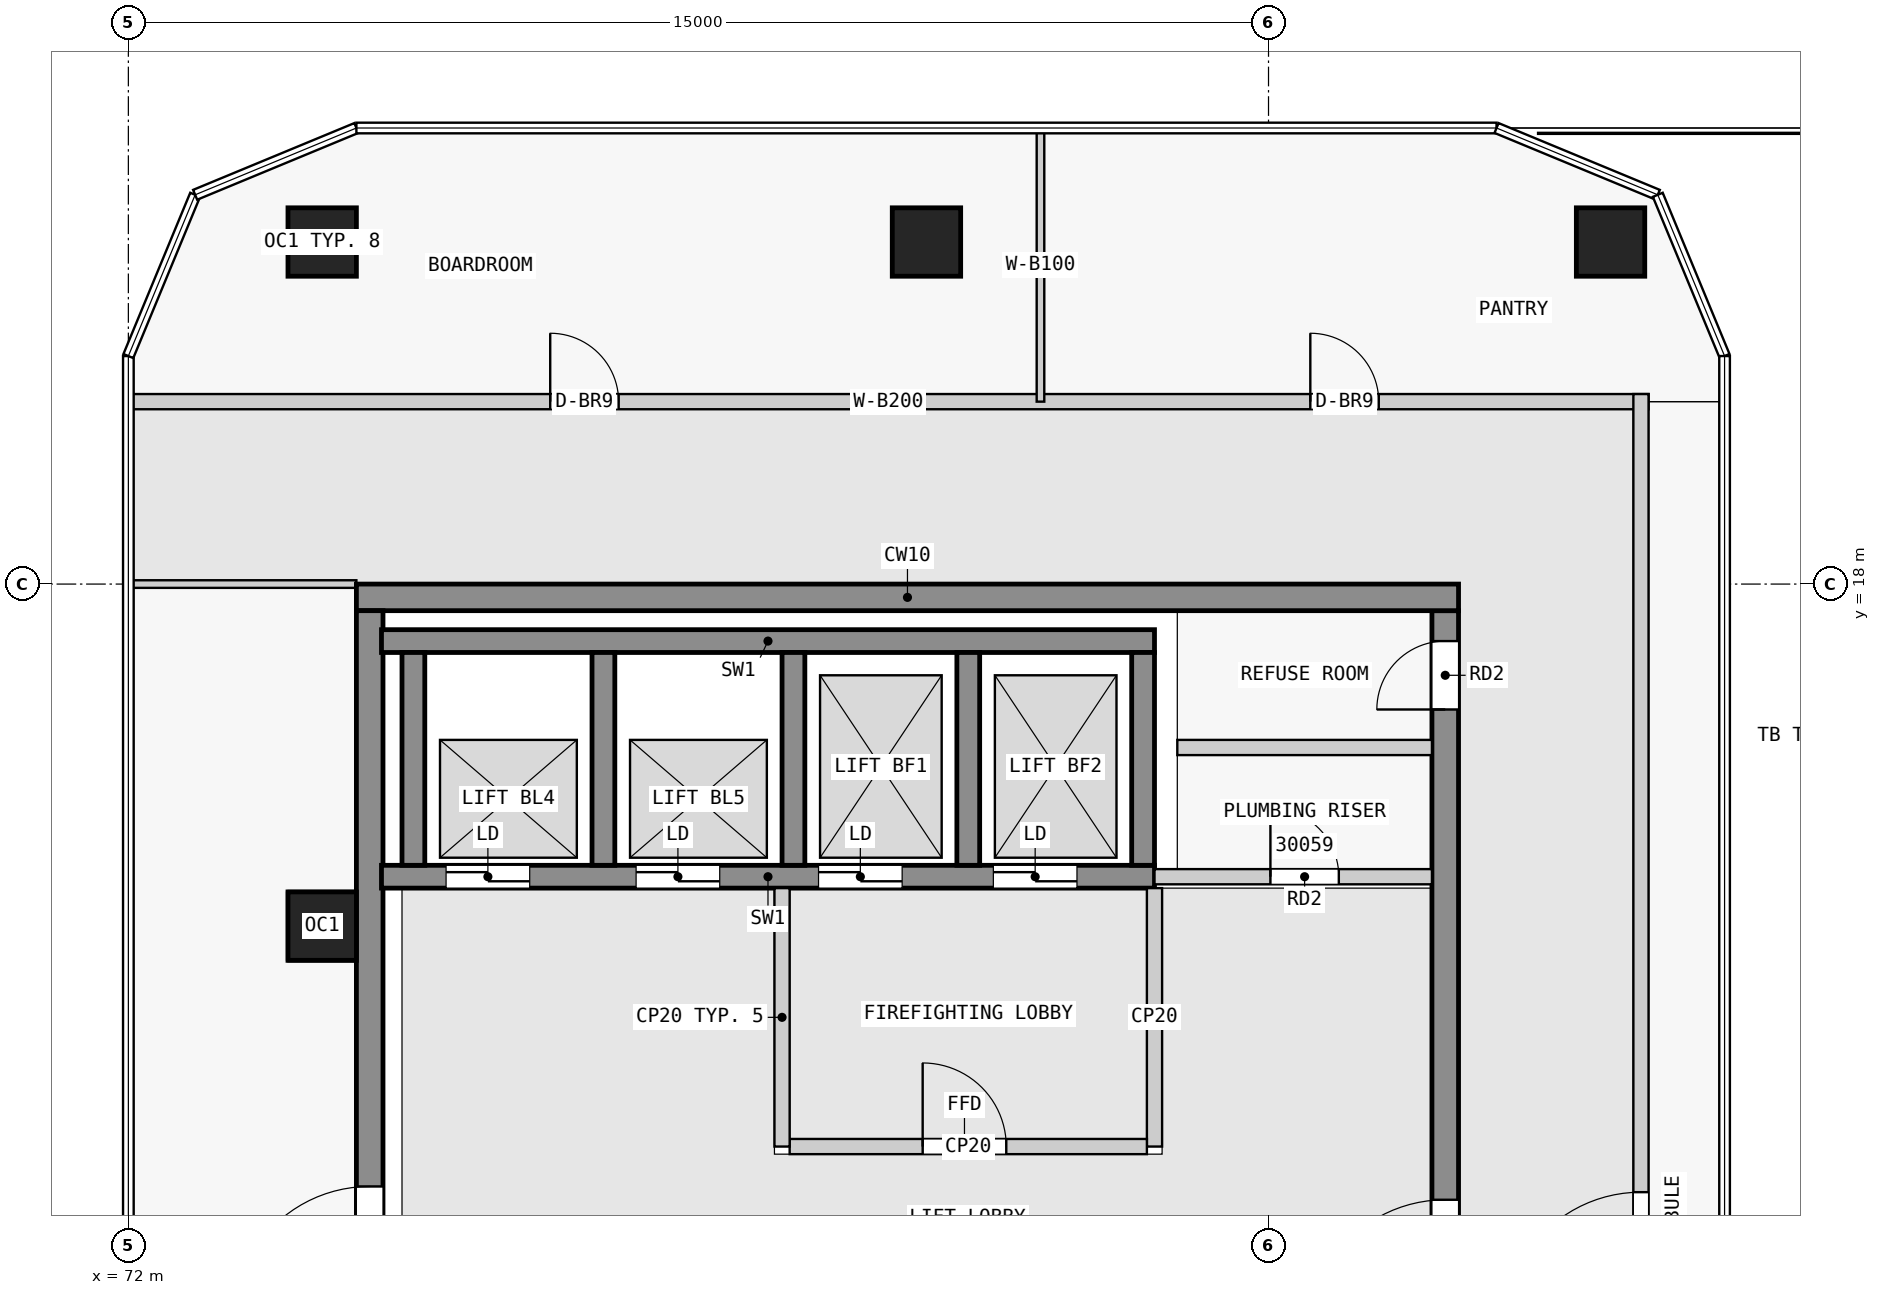
"""IFC4 building model, lengths in metres.
Left out: names, types, materials, properties, quantities, classifications, styles, units other than length and angle.
Written with IfcOpenShell. Run it as: python <this file> out.ifc"""

import sys

from ifc_helpers import new_model, si_unit, direction, frame, frame_2d, origin, origin_2d, place, context, subcontext, project, spatial, rectangle, extrude, element, fill, save


model = new_model("IFC4")
c1 = context("Model", 3, precision=1e-05, world=origin(), true_north=direction((0.0, 1.0)))
c2 = subcontext(c1, "Body", "Model", "MODEL_VIEW")
j1 = project(units=[si_unit("LENGTHUNIT", "METRE"), si_unit("PLANEANGLEUNIT", "RADIAN")], contexts=[c1])
p1 = place(None, origin())
s1 = spatial("IfcSite", under=j1, at=p1, CompositionType="ELEMENT")
p2 = place(p1, origin())
s2 = spatial("IfcBuilding", under=s1, at=p2, CompositionType="ELEMENT")
p3 = place(p2, frame((0.0, 0.0, 116.8)))
s3 = spatial("IfcBuildingStorey", under=s2, at=p3, CompositionType="ELEMENT", Elevation=116.8)
for number, where, z_axis, x_axis in (
    (1, (91.5, 22.5, 0.0), (0.0, 0.0, 1.0), (1.0, 0.0, 0.0)),
    (2, (82.5, 22.5, 0.0), (0.0, 0.0, 1.0), (1.0, 0.0, 0.0)),
    (3, (74.55, 22.5, 0.0), (0.0, 0.0, 1.0), (1.0, 0.0, 0.0)),
    (4, (74.55, 13.5, 0.0), (0.0, 0.0, 1.0), (1.0, 0.0, 0.0)),
):
    element("IfcColumn", number, at=place(p3, frame(where, z_axis=z_axis, x_axis=x_axis)), inside=s3, PredefinedType="COLUMN", context=c2, shape_type="SweptSolid", body=[
        extrude(rectangle(XDim=0.9, YDim=0.9, at=origin_2d()), origin(), (0.0, 0.0, 1.0), 3.5),
    ])
p4 = place(p3, frame((75.0, 17.825, 0.0), z_axis=(0.0, 0.0, 1.0), x_axis=(1.0, 0.0, 0.0)))
e5 = element("IfcWall", 5, at=p4, inside=s3, PredefinedType="SHEAR", context=c2, shape_type="SweptSolid", body=[
    extrude(rectangle(XDim=14.5, YDim=0.35, at=frame_2d((7.25, 0.0))), origin(), (0.0, 0.0, 1.0), 3.25),
])
p5 = place(p3, frame((75.175, 0.35, 0.0), z_axis=(0.0, 0.0, 1.0), x_axis=(0.0, 1.0, 0.0)))
e6 = element("IfcWall", 6, at=p5, inside=s3, PredefinedType="SHEAR", context=c2, shape_type="SweptSolid", body=[
    extrude(rectangle(XDim=17.3, YDim=0.35, at=frame_2d((8.65, 0.0))), origin(), (0.0, 0.0, 1.0), 3.25),
])
p6 = place(p5, frame((7.925, 0.0, 0.0)))
e7 = element("IfcOpeningElement", 7, at=p6, cuts=e6, PredefinedType="OPENING", context=c2, shape_type="SweptSolid", body=[
    extrude(rectangle(XDim=1.8, YDim=2.1, at=frame_2d((0.9, 1.05))), frame((0.0, 0.185, 0.0), z_axis=(0.0, -1.0, 0.0), x_axis=(1.0, 0.0, 0.0)), (0.0, 0.0, 1.0), 0.37),
])
p7 = place(p3, frame((89.325, 0.35, 0.0), z_axis=(0.0, 0.0, 1.0), x_axis=(0.0, 1.0, 0.0)))
e8 = element("IfcWall", 8, at=p7, inside=s3, PredefinedType="SHEAR", context=c2, shape_type="SweptSolid", body=[
    extrude(rectangle(XDim=17.3, YDim=0.35, at=frame_2d((8.65, 0.0))), origin(), (0.0, 0.0, 1.0), 3.25),
])
p8 = place(p7, frame((7.75, 0.0, 0.0)))
e9 = element("IfcOpeningElement", 9, at=p8, cuts=e8, PredefinedType="OPENING", context=c2, shape_type="SweptSolid", body=[
    extrude(rectangle(XDim=1.8, YDim=2.1, at=frame_2d((0.9, 1.05))), frame((0.0, 0.185, 0.0), z_axis=(0.0, -1.0, 0.0), x_axis=(1.0, 0.0, 0.0)), (0.0, 0.0, 1.0), 0.37),
])
p9 = place(p7, frame((16.0, 0.0, 0.0)))
e10 = element("IfcOpeningElement", 10, at=p9, cuts=e8, PredefinedType="OPENING", context=c2, shape_type="SweptSolid", body=[
    extrude(rectangle(XDim=0.9, YDim=2.1, at=frame_2d((0.45, 1.05))), frame((0.0, 0.185, 0.0), z_axis=(0.0, -1.0, 0.0), x_axis=(1.0, 0.0, 0.0)), (0.0, 0.0, 1.0), 0.37),
])
p10 = place(p3, frame((75.33, 17.25, 0.0), z_axis=(0.0, 0.0, 1.0), x_axis=(1.0, 0.0, 0.0)))
e11 = element("IfcWall", 11, at=p10, inside=s3, PredefinedType="SHEAR", context=c2, shape_type="SweptSolid", body=[
    extrude(rectangle(XDim=10.17, YDim=0.3, at=frame_2d((5.085, 0.0))), origin(), (0.0, 0.0, 1.0), 3.25),
])
p11 = place(p3, frame((75.33, 14.15, 0.0), z_axis=(0.0, 0.0, 1.0), x_axis=(1.0, 0.0, 0.0)))
e12 = element("IfcWall", 12, at=p11, inside=s3, PredefinedType="SHEAR", context=c2, shape_type="SweptSolid", body=[
    extrude(rectangle(XDim=10.17, YDim=0.3, at=frame_2d((5.085, 0.0))), origin(), (0.0, 0.0, 1.0), 3.25),
])
p12 = place(p11, frame((0.85, 0.0, 0.0)))
e13 = element("IfcOpeningElement", 13, at=p12, cuts=e12, PredefinedType="OPENING", context=c2, shape_type="SweptSolid", body=[
    extrude(rectangle(XDim=1.1, YDim=2.1, at=frame_2d((0.55, 1.05))), frame((0.0, 0.16, 0.0), z_axis=(0.0, -1.0, 0.0), x_axis=(1.0, 0.0, 0.0)), (0.0, 0.0, 1.0), 0.32),
])
p13 = place(p11, frame((3.35, 0.0, 0.0)))
e14 = element("IfcOpeningElement", 14, at=p13, cuts=e12, PredefinedType="OPENING", context=c2, shape_type="SweptSolid", body=[
    extrude(rectangle(XDim=1.1, YDim=2.1, at=frame_2d((0.55, 1.05))), frame((0.0, 0.16, 0.0), z_axis=(0.0, -1.0, 0.0), x_axis=(1.0, 0.0, 0.0)), (0.0, 0.0, 1.0), 0.32),
])
p14 = place(p11, frame((5.75, 0.0, 0.0)))
e15 = element("IfcOpeningElement", 15, at=p14, cuts=e12, PredefinedType="OPENING", context=c2, shape_type="SweptSolid", body=[
    extrude(rectangle(XDim=1.1, YDim=2.1, at=frame_2d((0.55, 1.05))), frame((0.0, 0.16, 0.0), z_axis=(0.0, -1.0, 0.0), x_axis=(1.0, 0.0, 0.0)), (0.0, 0.0, 1.0), 0.32),
])
p15 = place(p11, frame((8.05, 0.0, 0.0)))
e16 = element("IfcOpeningElement", 16, at=p15, cuts=e12, PredefinedType="OPENING", context=c2, shape_type="SweptSolid", body=[
    extrude(rectangle(XDim=1.1, YDim=2.1, at=frame_2d((0.55, 1.05))), frame((0.0, 0.16, 0.0), z_axis=(0.0, -1.0, 0.0), x_axis=(1.0, 0.0, 0.0)), (0.0, 0.0, 1.0), 0.32),
])
for number, where, z_axis, x_axis in (
    (17, (75.75, 14.3, 0.0), (0.0, 0.0, 1.0), (0.0, 1.0, 0.0)),
    (18, (78.25, 14.3, 0.0), (0.0, 0.0, 1.0), (0.0, 1.0, 0.0)),
    (19, (80.75, 14.3, 0.0), (0.0, 0.0, 1.0), (0.0, 1.0, 0.0)),
    (20, (83.05, 14.3, 0.0), (0.0, 0.0, 1.0), (0.0, 1.0, 0.0)),
    (21, (85.35, 14.3, 0.0), (0.0, 0.0, 1.0), (0.0, 1.0, 0.0)),
):
    element("IfcWall", number, at=place(p3, frame(where, z_axis=z_axis, x_axis=x_axis)), inside=s3, PredefinedType="SHEAR", context=c2, shape_type="SweptSolid", body=[
        extrude(rectangle(XDim=2.8, YDim=0.3, at=frame_2d((1.4, 0.0))), origin(), (0.0, 0.0, 1.0), 3.25),
    ])
p16 = place(p3, frame((80.6, 10.6, 0.0), z_axis=(0.0, 0.0, 1.0), x_axis=(0.0, 1.0, 0.0)))
e22 = element("IfcWall", 22, at=p16, inside=s3, PredefinedType="PARTITIONING", context=c2, shape_type="SweptSolid", body=[
    extrude(rectangle(XDim=3.4, YDim=0.2, at=frame_2d((1.7, 0.0))), origin(), (0.0, 0.0, 1.0), 3.25),
])
p17 = place(p3, frame((80.7, 10.6, 0.0), z_axis=(0.0, 0.0, 1.0), x_axis=(1.0, 0.0, 0.0)))
e23 = element("IfcWall", 23, at=p17, inside=s3, PredefinedType="PARTITIONING", context=c2, shape_type="SweptSolid", body=[
    extrude(rectangle(XDim=4.7, YDim=0.2, at=frame_2d((2.35, 0.0))), origin(), (0.0, 0.0, 1.0), 3.25),
])
p18 = place(p17, frame((1.75, 0.0, 0.0)))
e24 = element("IfcOpeningElement", 24, at=p18, cuts=e23, PredefinedType="OPENING", context=c2, shape_type="SweptSolid", body=[
    extrude(rectangle(XDim=1.1, YDim=2.1, at=frame_2d((0.55, 1.05))), frame((0.0, 0.11, 0.0), z_axis=(0.0, -1.0, 0.0), x_axis=(1.0, 0.0, 0.0)), (0.0, 0.0, 1.0), 0.22),
])
p19 = place(p3, frame((85.5, 10.6, 0.0), z_axis=(0.0, 0.0, 1.0), x_axis=(0.0, 1.0, 0.0)))
e25 = element("IfcWall", 25, at=p19, inside=s3, PredefinedType="PARTITIONING", context=c2, shape_type="SweptSolid", body=[
    extrude(rectangle(XDim=3.4, YDim=0.2, at=frame_2d((1.7, 0.0))), origin(), (0.0, 0.0, 1.0), 3.25),
])
p20 = place(p3, frame((85.5, 14.15, 0.0), z_axis=(0.0, 0.0, 1.0), x_axis=(1.0, 0.0, 0.0)))
e26 = element("IfcWall", 26, at=p20, inside=s3, PredefinedType="PARTITIONING", context=c2, shape_type="SweptSolid", body=[
    extrude(rectangle(XDim=3.65, YDim=0.2, at=frame_2d((1.825, 0.0))), origin(), (0.0, 0.0, 1.0), 3.25),
])
p21 = place(p20, frame((1.525, 0.0, 0.0)))
e27 = element("IfcOpeningElement", 27, at=p21, cuts=e26, PredefinedType="OPENING", context=c2, shape_type="SweptSolid", body=[
    extrude(rectangle(XDim=0.9, YDim=2.1, at=frame_2d((0.45, 1.05))), frame((0.0, 0.11, 0.0), z_axis=(0.0, -1.0, 0.0), x_axis=(1.0, 0.0, 0.0)), (0.0, 0.0, 1.0), 0.22),
])
p22 = place(p3, frame((85.8, 15.85, 0.0), z_axis=(0.0, 0.0, 1.0), x_axis=(1.0, 0.0, 0.0)))
e28 = element("IfcWall", 28, at=p22, inside=s3, PredefinedType="PARTITIONING", context=c2, shape_type="SweptSolid", body=[
    extrude(rectangle(XDim=3.35, YDim=0.2, at=frame_2d((1.675, 0.0))), origin(), (0.0, 0.0, 1.0), 3.25),
])
p23 = place(p3, frame((72.0, 20.4, 0.0), z_axis=(0.0, 0.0, 1.0), x_axis=(1.0, 0.0, 0.0)))
e29 = element("IfcWall", 29, at=p23, inside=s3, PredefinedType="PARTITIONING", context=c2, shape_type="SweptSolid", body=[
    extrude(rectangle(XDim=20.0, YDim=0.2, at=frame_2d((10.0, 0.0))), origin(), (0.0, 0.0, 1.0), 3.25),
])
p24 = place(p23, frame((5.55, 0.0, 0.0)))
e30 = element("IfcOpeningElement", 30, at=p24, cuts=e29, PredefinedType="OPENING", context=c2, shape_type="SweptSolid", body=[
    extrude(rectangle(XDim=0.9, YDim=2.1, at=frame_2d((0.45, 1.05))), frame((0.0, 0.11, 0.0), z_axis=(0.0, -1.0, 0.0), x_axis=(1.0, 0.0, 0.0)), (0.0, 0.0, 1.0), 0.22),
])
p25 = place(p23, frame((15.55, 0.0, 0.0)))
e31 = element("IfcOpeningElement", 31, at=p25, cuts=e29, PredefinedType="OPENING", context=c2, shape_type="SweptSolid", body=[
    extrude(rectangle(XDim=0.9, YDim=2.1, at=frame_2d((0.45, 1.05))), frame((0.0, 0.11, 0.0), z_axis=(0.0, -1.0, 0.0), x_axis=(1.0, 0.0, 0.0)), (0.0, 0.0, 1.0), 0.22),
])
p26 = place(p3, frame((91.9, -2.5, 0.0), z_axis=(0.0, 0.0, 1.0), x_axis=(0.0, 1.0, 0.0)))
e32 = element("IfcWall", 32, at=p26, inside=s3, PredefinedType="PARTITIONING", context=c2, shape_type="SweptSolid", body=[
    extrude(rectangle(XDim=23.0, YDim=0.2, at=frame_2d((11.5, 0.0))), origin(), (0.0, 0.0, 1.0), 3.25),
])
p27 = place(p26, frame((10.7, 0.0, 0.0)))
e33 = element("IfcOpeningElement", 33, at=p27, cuts=e32, PredefinedType="OPENING", context=c2, shape_type="SweptSolid", body=[
    extrude(rectangle(XDim=1.8, YDim=2.1, at=frame_2d((0.9, 1.05))), frame((0.0, 0.11, 0.0), z_axis=(0.0, -1.0, 0.0), x_axis=(1.0, 0.0, 0.0)), (0.0, 0.0, 1.0), 0.22),
])
p28 = place(p3, frame((84.0, 20.4, 0.0), z_axis=(0.0, 0.0, 1.0), x_axis=(0.0, 1.0, 0.0)))
e34 = element("IfcWall", 34, at=p28, inside=s3, PredefinedType="PARTITIONING", context=c2, shape_type="SweptSolid", body=[
    extrude(rectangle(XDim=3.6, YDim=0.1, at=frame_2d((1.8, 0.0))), origin(), (0.0, 0.0, 1.0), 3.25),
])
p29 = place(p3, frame((72.0, 18.0, 0.0), z_axis=(0.0, 0.0, 1.0), x_axis=(1.0, 0.0, 0.0)))
e35 = element("IfcWall", 35, at=p29, inside=s3, PredefinedType="PARTITIONING", context=c2, shape_type="SweptSolid", body=[
    extrude(rectangle(XDim=3.0, YDim=0.1, at=frame_2d((1.5, 0.0))), origin(), (0.0, 0.0, 1.0), 3.25),
])
p30 = place(p18, origin())
e36 = element("IfcDoor", 36, at=p30, inside=s3, OperationType="SINGLE_SWING_LEFT", PredefinedType="DOOR", context=c2, shape_type="SweptSolid", body=[
    extrude(rectangle(XDim=1.1, YDim=2.1, at=frame_2d((0.55, 1.05))), frame((0.0, 0.025, 0.0), z_axis=(0.0, -1.0, 0.0), x_axis=(1.0, 0.0, 0.0)), (0.0, 0.0, 1.0), 0.05),
])
fill(e24, e36)
p31 = place(p12, origin())
e37 = element("IfcDoor", 37, at=p31, inside=s3, OperationType="DOUBLE_DOOR_SLIDING", PredefinedType="DOOR", context=c2, shape_type="SweptSolid", body=[
    extrude(rectangle(XDim=1.1, YDim=2.1, at=frame_2d((0.55, 1.05))), frame((0.0, 0.025, 0.0), z_axis=(0.0, -1.0, 0.0), x_axis=(1.0, 0.0, 0.0)), (0.0, 0.0, 1.0), 0.05),
])
fill(e13, e37)
p32 = place(p13, origin())
e38 = element("IfcDoor", 38, at=p32, inside=s3, OperationType="DOUBLE_DOOR_SLIDING", PredefinedType="DOOR", context=c2, shape_type="SweptSolid", body=[
    extrude(rectangle(XDim=1.1, YDim=2.1, at=frame_2d((0.55, 1.05))), frame((0.0, 0.025, 0.0), z_axis=(0.0, -1.0, 0.0), x_axis=(1.0, 0.0, 0.0)), (0.0, 0.0, 1.0), 0.05),
])
fill(e14, e38)
p33 = place(p14, origin())
e39 = element("IfcDoor", 39, at=p33, inside=s3, OperationType="DOUBLE_DOOR_SLIDING", PredefinedType="DOOR", context=c2, shape_type="SweptSolid", body=[
    extrude(rectangle(XDim=1.1, YDim=2.1, at=frame_2d((0.55, 1.05))), frame((0.0, 0.025, 0.0), z_axis=(0.0, -1.0, 0.0), x_axis=(1.0, 0.0, 0.0)), (0.0, 0.0, 1.0), 0.05),
])
fill(e15, e39)
p34 = place(p15, origin())
e40 = element("IfcDoor", 40, at=p34, inside=s3, OperationType="DOUBLE_DOOR_SLIDING", PredefinedType="DOOR", context=c2, shape_type="SweptSolid", body=[
    extrude(rectangle(XDim=1.1, YDim=2.1, at=frame_2d((0.55, 1.05))), frame((0.0, 0.025, 0.0), z_axis=(0.0, -1.0, 0.0), x_axis=(1.0, 0.0, 0.0)), (0.0, 0.0, 1.0), 0.05),
])
fill(e16, e40)
p35 = place(p6, origin())
e41 = element("IfcDoor", 41, at=p35, inside=s3, OperationType="DOUBLE_DOOR_SINGLE_SWING", PredefinedType="DOOR", context=c2, shape_type="SweptSolid", body=[
    extrude(rectangle(XDim=1.8, YDim=2.1, at=frame_2d((0.9, 1.05))), frame((0.0, 0.025, 0.0), z_axis=(0.0, -1.0, 0.0), x_axis=(1.0, 0.0, 0.0)), (0.0, 0.0, 1.0), 0.05),
])
fill(e7, e41)
p36 = place(p8, origin())
e42 = element("IfcDoor", 42, at=p36, inside=s3, OperationType="DOUBLE_DOOR_SINGLE_SWING", PredefinedType="DOOR", context=c2, shape_type="SweptSolid", body=[
    extrude(rectangle(XDim=1.8, YDim=2.1, at=frame_2d((0.9, 1.05))), frame((0.0, 0.025, 0.0), z_axis=(0.0, -1.0, 0.0), x_axis=(1.0, 0.0, 0.0)), (0.0, 0.0, 1.0), 0.05),
])
fill(e9, e42)
p37 = place(p21, origin())
e43 = element("IfcDoor", 43, at=p37, inside=s3, OperationType="SINGLE_SWING_LEFT", PredefinedType="DOOR", context=c2, shape_type="SweptSolid", body=[
    extrude(rectangle(XDim=0.9, YDim=2.1, at=frame_2d((0.45, 1.05))), frame((0.0, 0.025, 0.0), z_axis=(0.0, -1.0, 0.0), x_axis=(1.0, 0.0, 0.0)), (0.0, 0.0, 1.0), 0.05),
])
fill(e27, e43)
p38 = place(p9, origin())
e44 = element("IfcDoor", 44, at=p38, inside=s3, OperationType="SINGLE_SWING_LEFT", PredefinedType="DOOR", context=c2, shape_type="SweptSolid", body=[
    extrude(rectangle(XDim=0.9, YDim=2.1, at=frame_2d((0.45, 1.05))), frame((0.0, 0.025, 0.0), z_axis=(0.0, -1.0, 0.0), x_axis=(1.0, 0.0, 0.0)), (0.0, 0.0, 1.0), 0.05),
])
fill(e10, e44)
p39 = place(p27, origin())
e45 = element("IfcDoor", 45, at=p39, inside=s3, OperationType="DOUBLE_DOOR_SINGLE_SWING", PredefinedType="DOOR", context=c2, shape_type="SweptSolid", body=[
    extrude(rectangle(XDim=1.8, YDim=2.1, at=frame_2d((0.9, 1.05))), frame((0.0, 0.025, 0.0), z_axis=(0.0, -1.0, 0.0), x_axis=(1.0, 0.0, 0.0)), (0.0, 0.0, 1.0), 0.05),
])
fill(e33, e45)
p40 = place(p24, origin())
e46 = element("IfcDoor", 46, at=p40, inside=s3, OperationType="SINGLE_SWING_LEFT", PredefinedType="DOOR", context=c2, shape_type="SweptSolid", body=[
    extrude(rectangle(XDim=0.9, YDim=2.1, at=frame_2d((0.45, 1.05))), frame((0.0, 0.025, 0.0), z_axis=(0.0, -1.0, 0.0), x_axis=(1.0, 0.0, 0.0)), (0.0, 0.0, 1.0), 0.05),
])
fill(e30, e46)
p41 = place(p25, origin())
e47 = element("IfcDoor", 47, at=p41, inside=s3, OperationType="SINGLE_SWING_LEFT", PredefinedType="DOOR", context=c2, shape_type="SweptSolid", body=[
    extrude(rectangle(XDim=0.9, YDim=2.1, at=frame_2d((0.45, 1.05))), frame((0.0, 0.025, 0.0), z_axis=(0.0, -1.0, 0.0), x_axis=(1.0, 0.0, 0.0)), (0.0, 0.0, 1.0), 0.05),
])
fill(e31, e47)
save(model, sys.argv[1])
